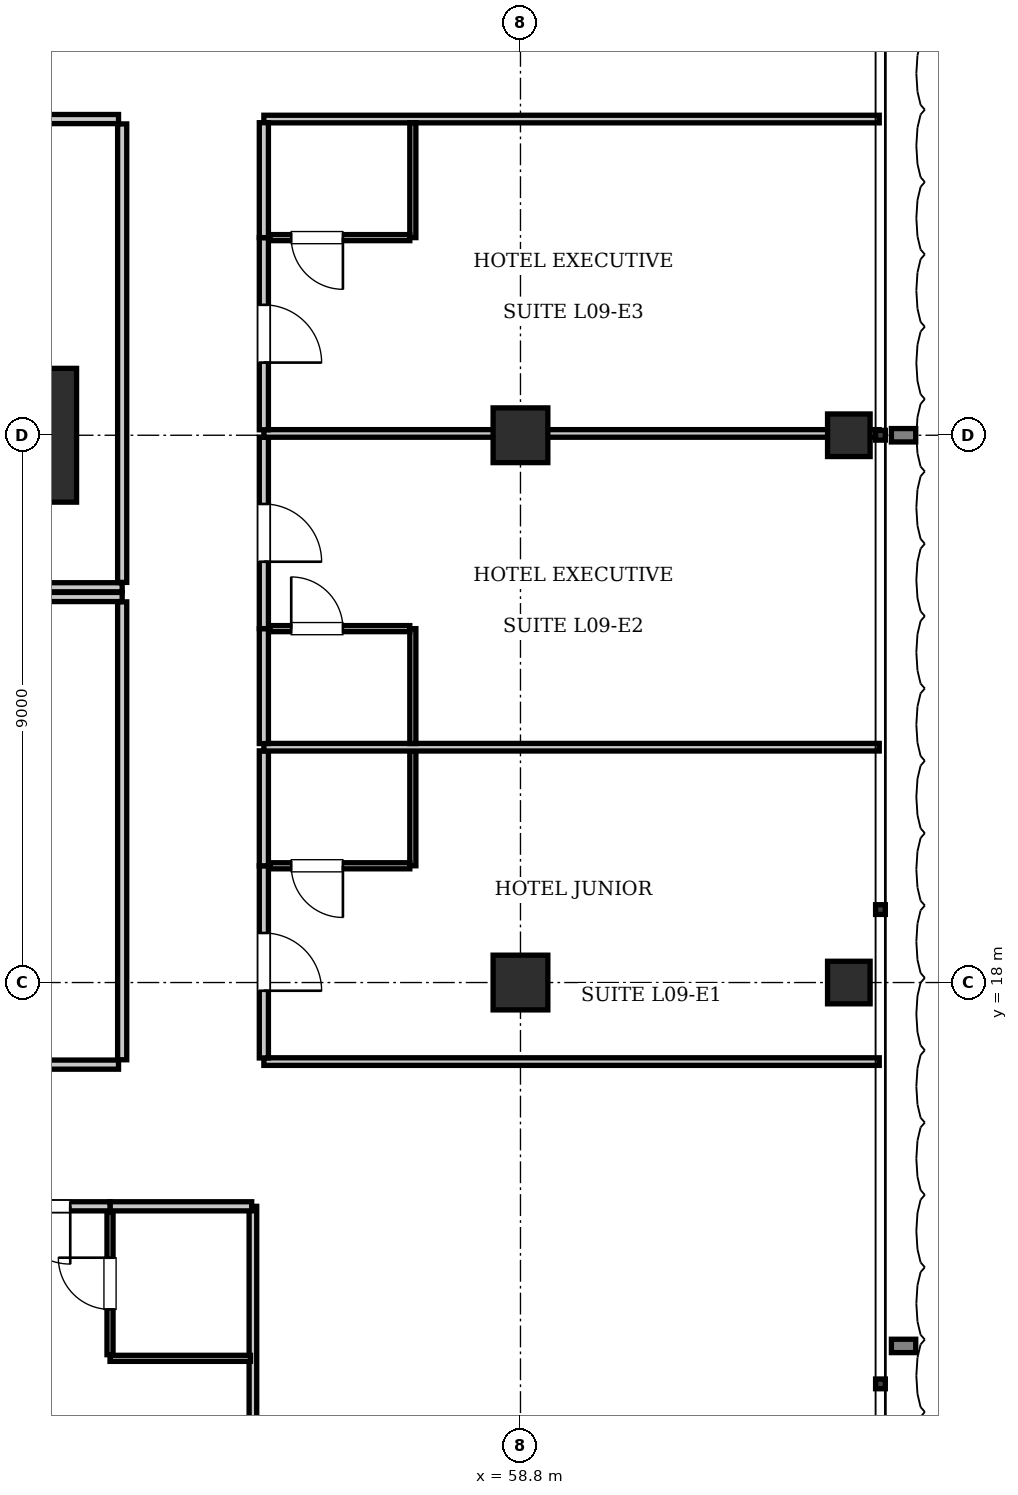
"""IFC4 building model, lengths in metres.
Left out: names, types, materials, properties, quantities, classifications, styles, units other than length and angle.
Written with IfcOpenShell. Run it as: python <this file> out.ifc"""

import sys

from ifc_helpers import new_model, si_unit, direction, frame, frame_2d, origin, origin_2d, place, context, subcontext, project, spatial, rectangle, i_section, extrude, element, fill, save


model = new_model("IFC4")
c1 = context("Model", 3, precision=1e-05, world=origin(), true_north=direction((0.0, 1.0)))
c2 = subcontext(c1, "Body", "Model", "MODEL_VIEW")
j1 = project(units=[si_unit("LENGTHUNIT", "METRE"), si_unit("PLANEANGLEUNIT", "RADIAN")], contexts=[c1])
p1 = place(None, origin())
s1 = spatial("IfcSite", under=j1, at=p1, CompositionType="ELEMENT")
p2 = place(p1, origin())
s2 = spatial("IfcBuilding", under=s1, at=p2, CompositionType="ELEMENT")
p3 = place(p2, frame((0.0, 0.0, 42.35)))
s3 = spatial("IfcBuildingStorey", under=s2, at=p3, CompositionType="ELEMENT", Elevation=42.35)
p4 = place(p3, frame((50.4, 27.0, 0.0), z_axis=(0.0, 0.0, 1.0), x_axis=(1.0, 0.0, 0.0)))
e1 = element("IfcColumn", 1, at=p4, inside=s3, PredefinedType="COLUMN", context=c2, shape_type="SweptSolid", body=[
    extrude(rectangle(XDim=2.2, YDim=2.2, at=origin_2d()), origin(), (0.0, 0.0, 1.0), 3.85),
])
for number, where, z_axis, x_axis in (
    (2, (58.8, 18.0, 0.0), (0.0, 0.0, 1.0), (1.0, 0.0, 0.0)),
    (3, (58.8, 27.0, 0.0), (0.0, 0.0, 1.0), (1.0, 0.0, 0.0)),
):
    element("IfcColumn", number, at=place(p3, frame(where, z_axis=z_axis, x_axis=x_axis)), inside=s3, PredefinedType="COLUMN", context=c2, shape_type="SweptSolid", body=[
        extrude(rectangle(XDim=0.9, YDim=0.9, at=origin_2d()), origin(), (0.0, 0.0, 1.0), 3.85),
    ])
for number, where, z_axis, x_axis in (
    (4, (64.2, 18.0, 0.0), (0.0, 0.0, 1.0), (1.0, 0.0, 0.0)),
    (5, (64.2, 27.0, 0.0), (0.0, 0.0, 1.0), (1.0, 0.0, 0.0)),
):
    element("IfcColumn", number, at=place(p3, frame(where, z_axis=z_axis, x_axis=x_axis)), inside=s3, PredefinedType="COLUMN", context=c2, shape_type="SweptSolid", body=[
        extrude(i_section(OverallWidth=0.7, OverallDepth=0.7, WebThickness=0.028, FlangeThickness=0.044, at=origin_2d()), origin(), (0.0, 0.0, 1.0), 3.85),
    ])
p5 = place(p3, frame((23.35, 24.5, 0.0), z_axis=(0.0, 0.0, 1.0), x_axis=(1.0, 0.0, 0.0)))
e6 = element("IfcWall", 6, at=p5, inside=s3, PredefinedType="PARTITIONING", context=c2, shape_type="SweptSolid", body=[
    extrude(rectangle(XDim=28.9, YDim=0.15, at=frame_2d((14.45, 0.0))), origin(), (0.0, 0.0, 1.0), 3.61),
])
p6 = place(p3, frame((52.25, 24.58, 0.0), z_axis=(0.0, 0.0, 1.0), x_axis=(0.0, 1.0, 0.0)))
e7 = element("IfcWall", 7, at=p6, inside=s3, PredefinedType="PARTITIONING", context=c2, shape_type="SweptSolid", body=[
    extrude(rectangle(XDim=7.54, YDim=0.15, at=frame_2d((3.77, 0.0))), origin(), (0.0, 0.0, 1.0), 3.61),
])
p7 = place(p3, frame((39.853, 32.2, 0.0), z_axis=(0.0, 0.0, 1.0), x_axis=(1.0, 0.0, 0.0)))
e8 = element("IfcWall", 8, at=p7, inside=s3, PredefinedType="PARTITIONING", context=c2, shape_type="SweptSolid", body=[
    extrude(rectangle(XDim=12.337, YDim=0.15, at=frame_2d((6.168, 0.0))), origin(), (0.0, 0.0, 1.0), 3.61),
])
p8 = place(p7, frame((5.719, 0.0, 0.0)))
e9 = element("IfcOpeningElement", 9, at=p8, cuts=e8, PredefinedType="OPENING", context=c2, shape_type="SweptSolid", body=[
    extrude(rectangle(XDim=0.9, YDim=2.1, at=frame_2d((0.45, 1.05))), frame((0.0, 0.085, 0.0), z_axis=(0.0, -1.0, 0.0), x_axis=(1.0, 0.0, 0.0)), (0.0, 0.0, 1.0), 0.17),
])
p9 = place(p3, frame((23.35, 24.34, 0.0), z_axis=(0.0, 0.0, 1.0), x_axis=(1.0, 0.0, 0.0)))
e10 = element("IfcWall", 10, at=p9, inside=s3, PredefinedType="PARTITIONING", context=c2, shape_type="SweptSolid", body=[
    extrude(rectangle(XDim=28.9, YDim=0.15, at=frame_2d((14.45, 0.0))), origin(), (0.0, 0.0, 1.0), 3.61),
])
p10 = place(p3, frame((52.25, 16.73, 0.0), z_axis=(0.0, 0.0, 1.0), x_axis=(0.0, 1.0, 0.0)))
e11 = element("IfcWall", 11, at=p10, inside=s3, PredefinedType="PARTITIONING", context=c2, shape_type="SweptSolid", body=[
    extrude(rectangle(XDim=7.53, YDim=0.15, at=frame_2d((3.765, 0.0))), origin(), (0.0, 0.0, 1.0), 3.61),
])
p11 = place(p3, frame((34.073, 16.65, 0.0), z_axis=(0.0, 0.0, 1.0), x_axis=(1.0, 0.0, 0.0)))
e12 = element("IfcWall", 12, at=p11, inside=s3, PredefinedType="PARTITIONING", context=c2, shape_type="SweptSolid", body=[
    extrude(rectangle(XDim=18.117, YDim=0.15, at=frame_2d((9.059, 0.0))), origin(), (0.0, 0.0, 1.0), 3.61),
])
p12 = place(p11, frame((8.729, 0.0, 0.0)))
e13 = element("IfcOpeningElement", 13, at=p12, cuts=e12, PredefinedType="OPENING", context=c2, shape_type="SweptSolid", body=[
    extrude(rectangle(XDim=0.9, YDim=2.1, at=frame_2d((0.45, 1.05))), frame((0.0, 0.085, 0.0), z_axis=(0.0, -1.0, 0.0), x_axis=(1.0, 0.0, 0.0)), (0.0, 0.0, 1.0), 0.17),
])
p13 = place(p3, frame((54.4, 0.1, 0.0), z_axis=(0.0, 0.0, 1.0), x_axis=(0.0, 1.0, 0.0)))
e14 = element("IfcWall", 14, at=p13, inside=s3, PredefinedType="PARTITIONING", context=c2, shape_type="SweptSolid", body=[
    extrude(rectangle(XDim=14.22, YDim=0.125, at=frame_2d((7.11, 0.0))), origin(), (0.0, 0.0, 1.0), 3.61),
])
p14 = place(p3, frame((52.05, 14.32, 0.0), z_axis=(0.0, 0.0, 1.0), x_axis=(1.0, 0.0, 0.0)))
e15 = element("IfcWall", 15, at=p14, inside=s3, PredefinedType="PARTITIONING", context=c2, shape_type="SweptSolid", body=[
    extrude(rectangle(XDim=2.33, YDim=0.15, at=frame_2d((1.165, 0.0))), origin(), (0.0, 0.0, 1.0), 3.61),
])
p15 = place(p3, frame((52.05, 11.82, 0.0), z_axis=(0.0, 0.0, 1.0), x_axis=(1.0, 0.0, 0.0)))
e16 = element("IfcWall", 16, at=p15, inside=s3, PredefinedType="PARTITIONING", context=c2, shape_type="SweptSolid", body=[
    extrude(rectangle(XDim=2.31, YDim=0.1, at=frame_2d((1.155, 0.0))), origin(), (0.0, 0.0, 1.0), 3.61),
])
p16 = place(p3, frame((52.05, 11.88, 0.0), z_axis=(0.0, 0.0, 1.0), x_axis=(0.0, 1.0, 0.0)))
e17 = element("IfcWall", 17, at=p16, inside=s3, PredefinedType="PARTITIONING", context=c2, shape_type="SweptSolid", body=[
    extrude(rectangle(XDim=2.34, YDim=0.1, at=frame_2d((1.17, 0.0))), origin(), (0.0, 0.0, 1.0), 3.61),
])
p17 = place(p16, frame((0.745, 0.0, 0.0)))
e18 = element("IfcOpeningElement", 18, at=p17, cuts=e17, PredefinedType="OPENING", context=c2, shape_type="SweptSolid", body=[
    extrude(rectangle(XDim=0.85, YDim=2.1, at=frame_2d((0.425, 1.05))), frame((0.0, 0.06, 0.0), z_axis=(0.0, -1.0, 0.0), x_axis=(1.0, 0.0, 0.0)), (0.0, 0.0, 1.0), 0.12),
])
p18 = place(p3, frame((49.792, 14.32, 0.0), z_axis=(0.0, 0.0, 1.0), x_axis=(1.0, 0.0, 0.0)))
e19 = element("IfcWall", 19, at=p18, inside=s3, PredefinedType="PARTITIONING", context=c2, shape_type="SweptSolid", body=[
    extrude(rectangle(XDim=2.258, YDim=0.15, at=frame_2d((1.129, 0.0))), origin(), (0.0, 0.0, 1.0), 3.61),
])
p19 = place(p18, frame((0.654, 0.0, 0.0)))
e20 = element("IfcOpeningElement", 20, at=p19, cuts=e19, PredefinedType="OPENING", context=c2, shape_type="SweptSolid", body=[
    extrude(rectangle(XDim=0.95, YDim=2.15, at=frame_2d((0.475, 1.075))), frame((0.0, 0.085, 0.0), z_axis=(0.0, -1.0, 0.0), x_axis=(1.0, 0.0, 0.0)), (0.0, 0.0, 1.0), 0.17),
])
for number, where, z_axis, x_axis in (
    (21, (54.58, 16.7, 0.0), (0.0, 0.0, 1.0), (1.0, 0.0, 0.0)),
    (22, (54.58, 32.2, 0.0), (0.0, 0.0, 1.0), (1.0, 0.0, 0.0)),
):
    element("IfcWall", number, at=place(p3, frame(where, z_axis=z_axis, x_axis=x_axis)), inside=s3, PredefinedType="PARTITIONING", context=c2, shape_type="SweptSolid", body=[
        extrude(rectangle(XDim=10.12, YDim=0.125, at=frame_2d((5.06, 0.0))), origin(), (0.0, 0.0, 1.0), 3.61),
    ])
p20 = place(p3, frame((54.58, 16.76, 0.0), z_axis=(0.0, 0.0, 1.0), x_axis=(0.0, 1.0, 0.0)))
e23 = element("IfcWall", 23, at=p20, inside=s3, PredefinedType="PARTITIONING", context=c2, shape_type="SweptSolid", body=[
    extrude(rectangle(XDim=3.16, YDim=0.15, at=frame_2d((1.58, 0.0))), origin(), (0.0, 0.0, 1.0), 3.352),
])
p21 = place(p20, frame((1.105, 0.0, 0.0)))
e24 = element("IfcOpeningElement", 24, at=p21, cuts=e23, PredefinedType="OPENING", context=c2, shape_type="SweptSolid", body=[
    extrude(rectangle(XDim=0.95, YDim=2.15, at=frame_2d((0.475, 1.075))), frame((0.0, 0.085, 0.0), z_axis=(0.0, -1.0, 0.0), x_axis=(1.0, 0.0, 0.0)), (0.0, 0.0, 1.0), 0.17),
])
p22 = place(p3, frame((54.58, 19.92, 0.0), z_axis=(0.0, 0.0, 1.0), x_axis=(0.0, 1.0, 0.0)))
e25 = element("IfcWall", 25, at=p22, inside=s3, PredefinedType="PARTITIONING", context=c2, shape_type="SweptSolid", body=[
    extrude(rectangle(XDim=1.89, YDim=0.15, at=frame_2d((0.945, 0.0))), origin(), (0.0, 0.0, 1.0), 3.403),
])
p23 = place(p3, frame((57.03, 19.92, 0.0), z_axis=(0.0, 0.0, 1.0), x_axis=(0.0, 1.0, 0.0)))
e26 = element("IfcWall", 26, at=p23, inside=s3, PredefinedType="PARTITIONING", context=c2, shape_type="SweptSolid", body=[
    extrude(rectangle(XDim=1.89, YDim=0.1, at=frame_2d((0.945, 0.0))), origin(), (0.0, 0.0, 1.0), 3.61),
])
p24 = place(p3, frame((54.68, 19.92, 0.0), z_axis=(0.0, 0.0, 1.0), x_axis=(1.0, 0.0, 0.0)))
e27 = element("IfcWall", 27, at=p24, inside=s3, PredefinedType="PARTITIONING", context=c2, shape_type="SweptSolid", body=[
    extrude(rectangle(XDim=2.3, YDim=0.1, at=frame_2d((1.15, 0.0))), origin(), (0.0, 0.0, 1.0), 3.61),
])
p25 = place(p24, frame((0.35, 0.0, 0.0)))
e28 = element("IfcOpeningElement", 28, at=p25, cuts=e27, PredefinedType="OPENING", context=c2, shape_type="SweptSolid", body=[
    extrude(rectangle(XDim=0.85, YDim=2.1, at=frame_2d((0.425, 1.05))), frame((0.0, 0.06, 0.0), z_axis=(0.0, -1.0, 0.0), x_axis=(1.0, 0.0, 0.0)), (0.0, 0.0, 1.0), 0.12),
])
p26 = place(p3, frame((54.58, 21.87, 0.0), z_axis=(0.0, 0.0, 1.0), x_axis=(1.0, 0.0, 0.0)))
e29 = element("IfcWall", 29, at=p26, inside=s3, PredefinedType="PARTITIONING", context=c2, shape_type="SweptSolid", body=[
    extrude(rectangle(XDim=10.12, YDim=0.125, at=frame_2d((5.06, 0.0))), origin(), (0.0, 0.0, 1.0), 3.61),
])
p27 = place(p3, frame((54.58, 21.93, 0.0), z_axis=(0.0, 0.0, 1.0), x_axis=(0.0, 1.0, 0.0)))
e30 = element("IfcWall", 30, at=p27, inside=s3, PredefinedType="PARTITIONING", context=c2, shape_type="SweptSolid", body=[
    extrude(rectangle(XDim=1.89, YDim=0.15, at=frame_2d((0.945, 0.0))), origin(), (0.0, 0.0, 1.0), 3.403),
])
p28 = place(p3, frame((54.58, 23.82, 0.0), z_axis=(0.0, 0.0, 1.0), x_axis=(0.0, 1.0, 0.0)))
e31 = element("IfcWall", 31, at=p28, inside=s3, PredefinedType="PARTITIONING", context=c2, shape_type="SweptSolid", body=[
    extrude(rectangle(XDim=3.15, YDim=0.15, at=frame_2d((1.575, 0.0))), origin(), (0.0, 0.0, 1.0), 3.403),
])
p29 = place(p28, frame((1.1, 0.0, 0.0)))
e32 = element("IfcOpeningElement", 32, at=p29, cuts=e31, PredefinedType="OPENING", context=c2, shape_type="SweptSolid", body=[
    extrude(rectangle(XDim=0.95, YDim=2.15, at=frame_2d((0.475, 1.075))), frame((0.0, 0.085, 0.0), z_axis=(0.0, -1.0, 0.0), x_axis=(1.0, 0.0, 0.0)), (0.0, 0.0, 1.0), 0.17),
])
p30 = place(p3, frame((57.03, 21.93, 0.0), z_axis=(0.0, 0.0, 1.0), x_axis=(0.0, 1.0, 0.0)))
e33 = element("IfcWall", 33, at=p30, inside=s3, PredefinedType="PARTITIONING", context=c2, shape_type="SweptSolid", body=[
    extrude(rectangle(XDim=1.89, YDim=0.1, at=frame_2d((0.945, 0.0))), origin(), (0.0, 0.0, 1.0), 3.61),
])
p31 = place(p3, frame((54.68, 23.82, 0.0), z_axis=(0.0, 0.0, 1.0), x_axis=(1.0, 0.0, 0.0)))
e34 = element("IfcWall", 34, at=p31, inside=s3, PredefinedType="PARTITIONING", context=c2, shape_type="SweptSolid", body=[
    extrude(rectangle(XDim=2.3, YDim=0.1, at=frame_2d((1.15, 0.0))), origin(), (0.0, 0.0, 1.0), 3.61),
])
p32 = place(p31, frame((0.35, 0.0, 0.0)))
e35 = element("IfcOpeningElement", 35, at=p32, cuts=e34, PredefinedType="OPENING", context=c2, shape_type="SweptSolid", body=[
    extrude(rectangle(XDim=0.85, YDim=2.1, at=frame_2d((0.425, 1.05))), frame((0.0, 0.06, 0.0), z_axis=(0.0, -1.0, 0.0), x_axis=(1.0, 0.0, 0.0)), (0.0, 0.0, 1.0), 0.12),
])
p33 = place(p3, frame((54.58, 27.03, 0.0), z_axis=(0.0, 0.0, 1.0), x_axis=(1.0, 0.0, 0.0)))
e36 = element("IfcWall", 36, at=p33, inside=s3, PredefinedType="PARTITIONING", context=c2, shape_type="SweptSolid", body=[
    extrude(rectangle(XDim=10.12, YDim=0.125, at=frame_2d((5.06, 0.0))), origin(), (0.0, 0.0, 1.0), 2.988),
])
p34 = place(p3, frame((54.58, 27.09, 0.0), z_axis=(0.0, 0.0, 1.0), x_axis=(0.0, 1.0, 0.0)))
e37 = element("IfcWall", 37, at=p34, inside=s3, PredefinedType="PARTITIONING", context=c2, shape_type="SweptSolid", body=[
    extrude(rectangle(XDim=3.16, YDim=0.15, at=frame_2d((1.58, 0.0))), origin(), (0.0, 0.0, 1.0), 3.457),
])
p35 = place(p34, frame((1.105, 0.0, 0.0)))
e38 = element("IfcOpeningElement", 38, at=p35, cuts=e37, PredefinedType="OPENING", context=c2, shape_type="SweptSolid", body=[
    extrude(rectangle(XDim=0.95, YDim=2.15, at=frame_2d((0.475, 1.075))), frame((0.0, 0.085, 0.0), z_axis=(0.0, -1.0, 0.0), x_axis=(1.0, 0.0, 0.0)), (0.0, 0.0, 1.0), 0.17),
])
p36 = place(p3, frame((54.58, 30.25, 0.0), z_axis=(0.0, 0.0, 1.0), x_axis=(0.0, 1.0, 0.0)))
e39 = element("IfcWall", 39, at=p36, inside=s3, PredefinedType="PARTITIONING", context=c2, shape_type="SweptSolid", body=[
    extrude(rectangle(XDim=1.89, YDim=0.15, at=frame_2d((0.945, 0.0))), origin(), (0.0, 0.0, 1.0), 3.457),
])
p37 = place(p3, frame((57.03, 30.25, 0.0), z_axis=(0.0, 0.0, 1.0), x_axis=(0.0, 1.0, 0.0)))
e40 = element("IfcWall", 40, at=p37, inside=s3, PredefinedType="PARTITIONING", context=c2, shape_type="SweptSolid", body=[
    extrude(rectangle(XDim=1.89, YDim=0.1, at=frame_2d((0.945, 0.0))), origin(), (0.0, 0.0, 1.0), 3.61),
])
p38 = place(p3, frame((54.68, 30.25, 0.0), z_axis=(0.0, 0.0, 1.0), x_axis=(1.0, 0.0, 0.0)))
e41 = element("IfcWall", 41, at=p38, inside=s3, PredefinedType="PARTITIONING", context=c2, shape_type="SweptSolid", body=[
    extrude(rectangle(XDim=2.3, YDim=0.1, at=frame_2d((1.15, 0.0))), origin(), (0.0, 0.0, 1.0), 3.61),
])
p39 = place(p38, frame((0.35, 0.0, 0.0)))
e42 = element("IfcOpeningElement", 42, at=p39, cuts=e41, PredefinedType="OPENING", context=c2, shape_type="SweptSolid", body=[
    extrude(rectangle(XDim=0.85, YDim=2.1, at=frame_2d((0.425, 1.05))), frame((0.0, 0.06, 0.0), z_axis=(0.0, -1.0, 0.0), x_axis=(1.0, 0.0, 0.0)), (0.0, 0.0, 1.0), 0.12),
])
p40 = place(p17, origin())
e43 = element("IfcDoor", 43, at=p40, inside=s3, OperationType="SINGLE_SWING_RIGHT", PredefinedType="DOOR", context=c2, shape_type="SweptSolid", body=[
    extrude(rectangle(XDim=0.85, YDim=2.1, at=frame_2d((0.425, 1.05))), frame((0.0, 0.025, 0.0), z_axis=(0.0, -1.0, 0.0), x_axis=(1.0, 0.0, 0.0)), (0.0, 0.0, 1.0), 0.05),
])
fill(e18, e43)
p41 = place(p19, frame((0.95, 0.0, 0.0), z_axis=(0.0, 0.0, 1.0), x_axis=(-1.0, 0.0, 0.0)))
e44 = element("IfcDoor", 44, at=p41, inside=s3, OperationType="SINGLE_SWING_LEFT", PredefinedType="DOOR", context=c2, shape_type="SweptSolid", body=[
    extrude(rectangle(XDim=0.95, YDim=2.15, at=frame_2d((0.475, 1.075))), frame((0.0, 0.025, 0.0), z_axis=(0.0, -1.0, 0.0), x_axis=(1.0, 0.0, 0.0)), (0.0, 0.0, 1.0), 0.05),
])
fill(e20, e44)
p42 = place(p25, frame((0.85, 0.0, 0.0), z_axis=(0.0, 0.0, 1.0), x_axis=(-1.0, 0.0, 0.0)))
e45 = element("IfcDoor", 45, at=p42, inside=s3, OperationType="SINGLE_SWING_LEFT", PredefinedType="DOOR", context=c2, shape_type="SweptSolid", body=[
    extrude(rectangle(XDim=0.85, YDim=2.1, at=frame_2d((0.425, 1.05))), frame((0.0, 0.025, 0.0), z_axis=(0.0, -1.0, 0.0), x_axis=(1.0, 0.0, 0.0)), (0.0, 0.0, 1.0), 0.05),
])
fill(e28, e45)
p43 = place(p21, frame((0.95, 0.0, 0.0), z_axis=(0.0, 0.0, 1.0), x_axis=(-1.0, 0.0, 0.0)))
e46 = element("IfcDoor", 46, at=p43, inside=s3, OperationType="SINGLE_SWING_RIGHT", PredefinedType="DOOR", context=c2, shape_type="SweptSolid", body=[
    extrude(rectangle(XDim=0.95, YDim=2.15, at=frame_2d((0.475, 1.075))), frame((0.0, 0.025, 0.0), z_axis=(0.0, -1.0, 0.0), x_axis=(1.0, 0.0, 0.0)), (0.0, 0.0, 1.0), 0.05),
])
fill(e24, e46)
p44 = place(p32, origin())
e47 = element("IfcDoor", 47, at=p44, inside=s3, OperationType="SINGLE_SWING_LEFT", PredefinedType="DOOR", context=c2, shape_type="SweptSolid", body=[
    extrude(rectangle(XDim=0.85, YDim=2.1, at=frame_2d((0.425, 1.05))), frame((0.0, 0.025, 0.0), z_axis=(0.0, -1.0, 0.0), x_axis=(1.0, 0.0, 0.0)), (0.0, 0.0, 1.0), 0.05),
])
fill(e35, e47)
p45 = place(p29, frame((0.95, 0.0, 0.0), z_axis=(0.0, 0.0, 1.0), x_axis=(-1.0, 0.0, 0.0)))
e48 = element("IfcDoor", 48, at=p45, inside=s3, OperationType="SINGLE_SWING_RIGHT", PredefinedType="DOOR", context=c2, shape_type="SweptSolid", body=[
    extrude(rectangle(XDim=0.95, YDim=2.15, at=frame_2d((0.475, 1.075))), frame((0.0, 0.025, 0.0), z_axis=(0.0, -1.0, 0.0), x_axis=(1.0, 0.0, 0.0)), (0.0, 0.0, 1.0), 0.05),
])
fill(e32, e48)
p46 = place(p39, frame((0.85, 0.0, 0.0), z_axis=(0.0, 0.0, 1.0), x_axis=(-1.0, 0.0, 0.0)))
e49 = element("IfcDoor", 49, at=p46, inside=s3, OperationType="SINGLE_SWING_LEFT", PredefinedType="DOOR", context=c2, shape_type="SweptSolid", body=[
    extrude(rectangle(XDim=0.85, YDim=2.1, at=frame_2d((0.425, 1.05))), frame((0.0, 0.025, 0.0), z_axis=(0.0, -1.0, 0.0), x_axis=(1.0, 0.0, 0.0)), (0.0, 0.0, 1.0), 0.05),
])
fill(e42, e49)
p47 = place(p35, frame((0.95, 0.0, 0.0), z_axis=(0.0, 0.0, 1.0), x_axis=(-1.0, 0.0, 0.0)))
e50 = element("IfcDoor", 50, at=p47, inside=s3, OperationType="SINGLE_SWING_RIGHT", PredefinedType="DOOR", context=c2, shape_type="SweptSolid", body=[
    extrude(rectangle(XDim=0.95, YDim=2.15, at=frame_2d((0.475, 1.075))), frame((0.0, 0.025, 0.0), z_axis=(0.0, -1.0, 0.0), x_axis=(1.0, 0.0, 0.0)), (0.0, 0.0, 1.0), 0.05),
])
fill(e38, e50)
save(model, sys.argv[1])
